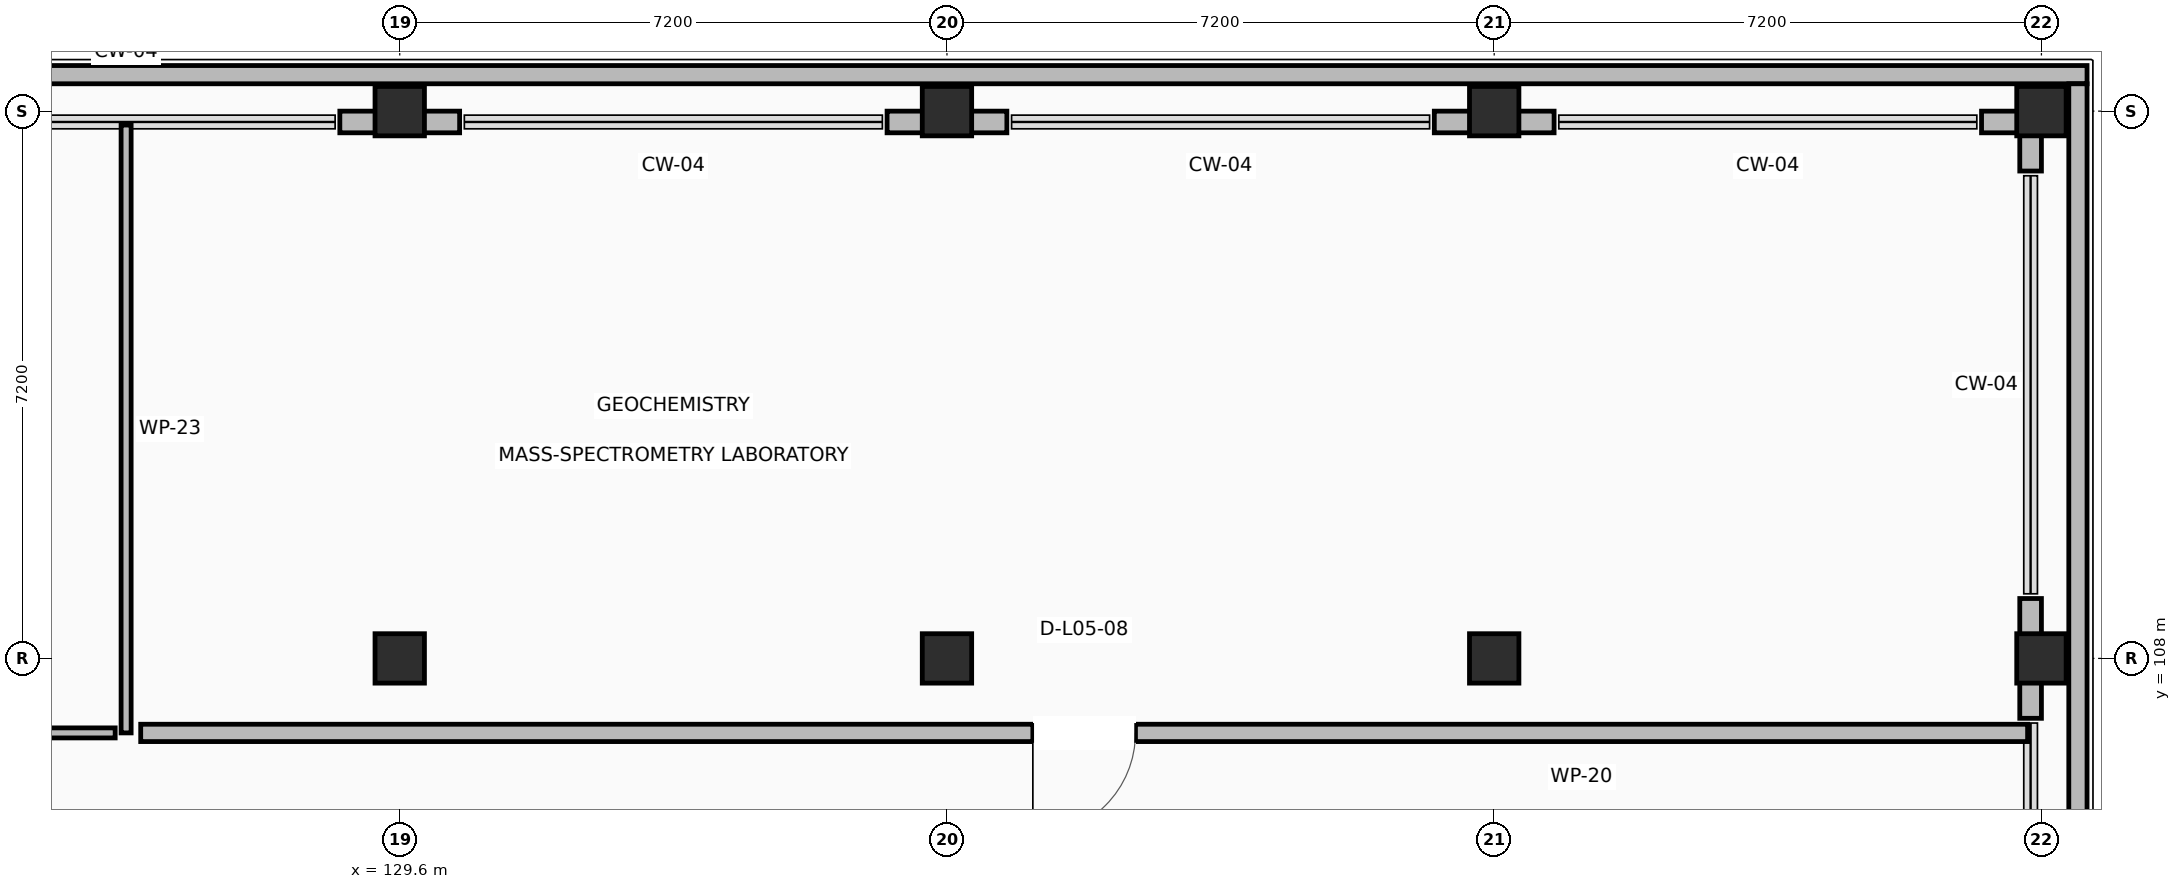
"""IFC4 building model, lengths in metres.
Left out: names, types, materials, properties, quantities, classifications, styles, units other than length and angle.
Written with IfcOpenShell. Run it as: python <this file> out.ifc"""

import sys

from ifc_helpers import new_model, si_unit, direction, frame, frame_2d, origin, origin_2d, place, context, subcontext, project, spatial, rectangle, extrude, element, fill, save


model = new_model("IFC4")
c1 = context("Model", 3, precision=1e-05, world=origin(), true_north=direction((0.0, 1.0)))
c2 = subcontext(c1, "Body", "Model", "MODEL_VIEW")
j1 = project(units=[si_unit("LENGTHUNIT", "METRE"), si_unit("PLANEANGLEUNIT", "RADIAN")], contexts=[c1])
p1 = place(None, origin())
s1 = spatial("IfcSite", under=j1, at=p1, CompositionType="ELEMENT")
p2 = place(p1, origin())
s2 = spatial("IfcBuilding", under=s1, at=p2, CompositionType="ELEMENT")
p3 = place(p2, frame((0.0, 0.0, 22.5)))
s3 = spatial("IfcBuildingStorey", under=s2, at=p3, CompositionType="ELEMENT", Elevation=22.5)
for number, where, z_axis, x_axis in (
    (1, (129.6, 108.0, 0.0), (0.0, 0.0, 1.0), (1.0, 0.0, 0.0)),
    (2, (129.6, 115.2, 0.0), (0.0, 0.0, 1.0), (1.0, 0.0, 0.0)),
    (3, (136.8, 108.0, 0.0), (0.0, 0.0, 1.0), (1.0, 0.0, 0.0)),
    (4, (136.8, 115.2, 0.0), (0.0, 0.0, 1.0), (1.0, 0.0, 0.0)),
    (5, (144.0, 108.0, 0.0), (0.0, 0.0, 1.0), (1.0, 0.0, 0.0)),
    (6, (144.0, 115.2, 0.0), (0.0, 0.0, 1.0), (1.0, 0.0, 0.0)),
    (7, (151.2, 108.0, 0.0), (0.0, 0.0, 1.0), (1.0, 0.0, 0.0)),
    (8, (151.2, 115.2, 0.0), (0.0, 0.0, 1.0), (1.0, 0.0, 0.0)),
):
    element("IfcColumn", number, at=place(p3, frame(where, z_axis=z_axis, x_axis=x_axis)), inside=s3, PredefinedType="COLUMN", context=c2, shape_type="SweptSolid", body=[
        extrude(rectangle(XDim=0.65, YDim=0.65, at=origin_2d()), origin(), (0.0, 0.0, 1.0), 4.22),
    ])
p4 = place(p3, frame((151.058, 107.212, 0.0), z_axis=(0.0, 0.0, 1.0), x_axis=(0.0, 1.0, 0.0)))
e9 = element("IfcWall", 9, at=p4, inside=s3, PredefinedType="STANDARD", context=c2, shape_type="SweptSolid", body=[
    extrude(rectangle(XDim=1.576, YDim=0.285, at=frame_2d((0.788, 0.0))), origin(), (0.0, 0.0, 1.0), 3.26),
])
p5 = place(p3, frame((151.058, 114.412, 0.0), z_axis=(0.0, 0.0, 1.0), x_axis=(0.0, 1.0, 0.0)))
e10 = element("IfcWall", 10, at=p5, inside=s3, PredefinedType="STANDARD", context=c2, shape_type="SweptSolid", body=[
    extrude(rectangle(XDim=0.503, YDim=0.285, at=frame_2d((0.251, 0.0))), origin(), (0.0, 0.0, 1.0), 3.26),
])
p6 = place(p3, frame((151.2, 115.058, 0.0), z_axis=(0.0, 0.0, 1.0), x_axis=(-1.0, 0.0, 0.0)))
e11 = element("IfcWall", 11, at=p6, inside=s3, PredefinedType="STANDARD", context=c2, shape_type="SweptSolid", body=[
    extrude(rectangle(XDim=0.788, YDim=0.285, at=frame_2d((0.394, 0.0))), origin(), (0.0, 0.0, 1.0), 3.26),
])
p7 = place(p3, frame((144.788, 115.058, 0.0), z_axis=(0.0, 0.0, 1.0), x_axis=(-1.0, 0.0, 0.0)))
e12 = element("IfcWall", 12, at=p7, inside=s3, PredefinedType="STANDARD", context=c2, shape_type="SweptSolid", body=[
    extrude(rectangle(XDim=1.576, YDim=0.285, at=frame_2d((0.788, 0.0))), origin(), (0.0, 0.0, 1.0), 3.26),
])
for number, where, z_axis, x_axis in (
    (13, (137.588, 115.058, 0.0), (0.0, 0.0, 1.0), (-1.0, 0.0, 0.0)),
    (14, (130.388, 115.058, 0.0), (0.0, 0.0, 1.0), (-1.0, 0.0, 0.0)),
):
    element("IfcWall", number, at=place(p3, frame(where, z_axis=z_axis, x_axis=x_axis)), inside=s3, PredefinedType="STANDARD", context=c2, shape_type="SweptSolid", body=[
        extrude(rectangle(XDim=1.576, YDim=0.285, at=frame_2d((0.788, 0.0))), origin(), (0.0, 0.0, 1.0), 3.26),
    ])
p8 = place(p3, frame((78.6, 115.68, 0.0), z_axis=(0.0, 0.0, 1.0), x_axis=(1.0, 0.0, 0.0)))
e15 = element("IfcWall", 15, at=p8, inside=s3, PredefinedType="PARAPET", context=c2, shape_type="SweptSolid", body=[
    extrude(rectangle(XDim=73.2, YDim=0.24, at=frame_2d((36.6, 0.0))), origin(), (0.0, 0.0, 1.0), 1.12),
])
p9 = place(p3, frame((151.68, 115.56, 0.0), z_axis=(0.0, 0.0, 1.0), x_axis=(0.0, -1.0, 0.0)))
e16 = element("IfcWall", 16, at=p9, inside=s3, PredefinedType="PARAPET", context=c2, shape_type="SweptSolid", body=[
    extrude(rectangle(XDim=21.36, YDim=0.24, at=frame_2d((10.68, 0.0))), origin(), (0.0, 0.0, 1.0), 1.12),
])
p10 = place(p3, frame((126.0, 115.017, 0.0), z_axis=(0.0, 0.0, 1.0), x_axis=(0.0, -1.0, 0.0)))
e17 = element("IfcWall", 17, at=p10, inside=s3, PredefinedType="PARTITIONING", context=c2, shape_type="SweptSolid", body=[
    extrude(rectangle(XDim=7.997, YDim=0.132, at=frame_2d((3.999, 0.0))), origin(), (0.0, 0.0, 1.0), 3.26),
])
p11 = place(p3, frame((125.856, 107.02, 0.0), z_axis=(0.0, 0.0, 1.0), x_axis=(-1.0, 0.0, 0.0)))
e18 = element("IfcWall", 18, at=p11, inside=s3, PredefinedType="PARTITIONING", context=c2, shape_type="SweptSolid", body=[
    extrude(rectangle(XDim=21.29, YDim=0.132, at=frame_2d((10.645, 0.0))), origin(), (0.0, 0.0, 1.0), 3.26),
])
p12 = place(p11, frame((9.105, 0.0, 0.0)))
e19 = element("IfcOpeningElement", 19, at=p12, cuts=e18, PredefinedType="OPENING", context=c2, shape_type="SweptSolid", body=[
    extrude(rectangle(XDim=0.98, YDim=2.1, at=frame_2d((0.49, 1.05))), frame((0.0, 0.076, 0.0), z_axis=(0.0, -1.0, 0.0), x_axis=(1.0, 0.0, 0.0)), (0.0, 0.0, 1.0), 0.152),
])
p13 = place(p3, frame((151.018, 107.02, 0.0), z_axis=(0.0, 0.0, 1.0), x_axis=(-1.0, 0.0, 0.0)))
e20 = element("IfcWall", 20, at=p13, inside=s3, PredefinedType="PARTITIONING", context=c2, shape_type="SweptSolid", body=[
    extrude(rectangle(XDim=24.826, YDim=0.228, at=frame_2d((12.413, 0.0))), origin(), (0.0, 0.0, 1.0), 3.26),
])
p14 = place(p13, frame((11.738, 0.0, 0.0)))
e21 = element("IfcOpeningElement", 21, at=p14, cuts=e20, PredefinedType="OPENING", context=c2, shape_type="SweptSolid", body=[
    extrude(rectangle(XDim=1.35, YDim=2.15, at=frame_2d((0.675, 1.075))), frame((0.0, 0.124, 0.0), z_axis=(0.0, -1.0, 0.0), x_axis=(1.0, 0.0, 0.0)), (0.0, 0.0, 1.0), 0.248),
])
p15 = place(p14, origin())
e22 = element("IfcDoor", 22, at=p15, inside=s3, OperationType="SINGLE_SWING_RIGHT", PredefinedType="DOOR", context=c2, shape_type="SweptSolid", body=[
    extrude(rectangle(XDim=1.35, YDim=2.15, at=frame_2d((0.675, 1.075))), frame((0.0, 0.025, 0.0), z_axis=(0.0, -1.0, 0.0), x_axis=(1.0, 0.0, 0.0)), (0.0, 0.0, 1.0), 0.05),
])
fill(e21, e22)
save(model, sys.argv[1])
